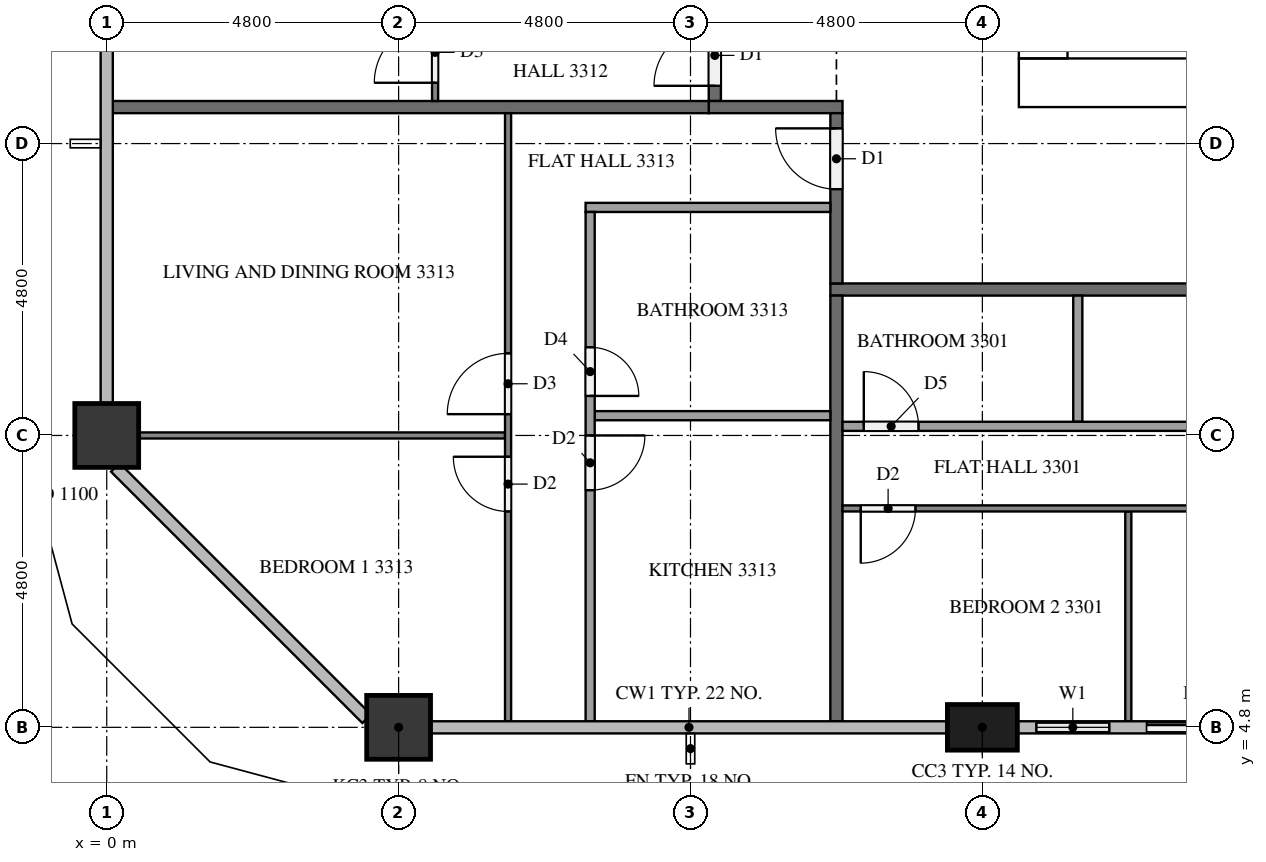
"""IFC4 building model, lengths in metres.
Left out: names, types, materials, properties, quantities, classifications, styles, units other than length and angle.
Written with IfcOpenShell. Run it as: python <this file> out.ifc"""

import sys

from ifc_helpers import new_model, si_unit, direction, frame, frame_2d, origin, origin_2d, place, context, subcontext, project, spatial, rectangle, extrude, element, fill, save


model = new_model("IFC4")
c1 = context("Model", 3, precision=1e-05, world=origin(), true_north=direction((0.0, 1.0)))
c2 = subcontext(c1, "Body", "Model", "MODEL_VIEW")
j1 = project(units=[si_unit("LENGTHUNIT", "METRE"), si_unit("PLANEANGLEUNIT", "RADIAN")], contexts=[c1])
p1 = place(None, origin())
s1 = spatial("IfcSite", under=j1, at=p1, CompositionType="ELEMENT")
p2 = place(p1, origin())
s2 = spatial("IfcBuilding", under=s1, at=p2, CompositionType="ELEMENT")
p3 = place(p2, frame((0.0, 0.0, 129.6)))
s3 = spatial("IfcBuildingStorey", under=s2, at=p3, CompositionType="ELEMENT", Elevation=129.6)
p4 = place(p3, frame((15.0, 15.4, 0.0), z_axis=(0.0, 0.0, 1.0), x_axis=(1.0, 0.0, 0.0)))
e1 = element("IfcWall", 1, at=p4, inside=s3, PredefinedType="SHEAR", context=c2, shape_type="SweptSolid", body=[
    extrude(rectangle(XDim=32.4, YDim=0.8, at=frame_2d((16.2, 0.0))), origin(), (0.0, 0.0, 1.0), 3.2),
])
p5 = place(p4, frame((15.3, 0.0, 0.0)))
e2 = element("IfcOpeningElement", 2, at=p5, cuts=e1, PredefinedType="OPENING", context=c2, shape_type="SweptSolid", body=[
    extrude(rectangle(XDim=1.8, YDim=2.1, at=frame_2d((0.9, 1.05))), frame((0.0, 0.41, 0.0), z_axis=(0.0, -1.0, 0.0), x_axis=(1.0, 0.0, 0.0)), (0.0, 0.0, 1.0), 0.82),
])
p6 = place(p3, frame((15.4, 15.8, 0.0), z_axis=(0.0, 0.0, 1.0), x_axis=(0.0, 1.0, 0.0)))
e3 = element("IfcWall", 3, at=p6, inside=s3, PredefinedType="SHEAR", context=c2, shape_type="SweptSolid", body=[
    extrude(rectangle(XDim=21.2, YDim=0.8, at=frame_2d((10.6, 0.0))), origin(), (0.0, 0.0, 1.0), 3.2),
])
p7 = place(p6, frame((4.96, 0.0, 0.0)))
e4 = element("IfcOpeningElement", 4, at=p7, cuts=e3, PredefinedType="OPENING", context=c2, shape_type="SweptSolid", body=[
    extrude(rectangle(XDim=1.2, YDim=2.1, at=frame_2d((0.6, 1.05))), frame((0.0, 0.41, 0.0), z_axis=(0.0, -1.0, 0.0), x_axis=(1.0, 0.0, 0.0)), (0.0, 0.0, 1.0), 0.82),
])
p8 = place(p3, frame((4.8, 4.8, 0.0), z_axis=(0.0, 0.0, 1.0), x_axis=(1.0, 0.0, 0.0)))
e5 = element("IfcColumn", 5, at=p8, inside=s3, PredefinedType="COLUMN", context=c2, shape_type="SweptSolid", body=[
    extrude(rectangle(XDim=1.05, YDim=1.05, at=origin_2d()), origin(), (0.0, 0.0, 1.0), 3.2),
])
p9 = place(p3, frame((14.4, 4.8, 0.0), z_axis=(0.0, 0.0, 1.0), x_axis=(1.0, 0.0, 0.0)))
e6 = element("IfcColumn", 6, at=p9, inside=s3, PredefinedType="COLUMN", context=c2, shape_type="SweptSolid", body=[
    extrude(rectangle(XDim=1.15, YDim=0.75, at=origin_2d()), origin(), (0.0, 0.0, 1.0), 3.2),
])
p10 = place(p3, frame((0.0, 9.6, 0.0), z_axis=(0.0, 0.0, 1.0), x_axis=(1.0, 0.0, 0.0)))
e7 = element("IfcColumn", 7, at=p10, inside=s3, PredefinedType="COLUMN", context=c2, shape_type="SweptSolid", body=[
    extrude(rectangle(XDim=1.05, YDim=1.05, at=origin_2d()), origin(), (0.0, 0.0, 1.0), 3.2),
])
p11 = place(p3, frame((14.975, 4.8, 0.0), z_axis=(0.0, 0.0, 1.0), x_axis=(1.0, 0.0, 0.0)))
e8 = element("IfcWall", 8, at=p11, inside=s3, PredefinedType="SOLIDWALL", context=c2, shape_type="SweptSolid", body=[
    extrude(rectangle(XDim=4.225, YDim=0.15, at=frame_2d((2.112, 0.0))), origin(), (0.0, 0.0, 1.0), 3.2),
])
p12 = place(p11, frame((0.312, 0.0, 0.9)))
e9 = element("IfcOpeningElement", 9, at=p12, cuts=e8, PredefinedType="OPENING", context=c2, shape_type="SweptSolid", body=[
    extrude(rectangle(XDim=1.2, YDim=1.4, at=frame_2d((0.6, 0.7))), frame((0.0, 0.085, 0.0), z_axis=(0.0, -1.0, 0.0), x_axis=(1.0, 0.0, 0.0)), (0.0, 0.0, 1.0), 0.17),
])
p13 = place(p11, frame((2.125, 0.0, 0.0)))
e10 = element("IfcOpeningElement", 10, at=p13, cuts=e8, PredefinedType="OPENING", context=c2, shape_type="SweptSolid", body=[
    extrude(rectangle(XDim=1.8, YDim=2.4, at=frame_2d((0.9, 1.2))), frame((0.0, 0.085, 0.0), z_axis=(0.0, -1.0, 0.0), x_axis=(1.0, 0.0, 0.0)), (0.0, 0.0, 1.0), 0.17),
])
p14 = place(p3, frame((50.5, 12.0, 0.0), z_axis=(0.0, 0.0, 1.0), x_axis=(-1.0, 0.0, 0.0)))
e11 = element("IfcWall", 11, at=p14, inside=s3, PredefinedType="PARTITIONING", context=c2, shape_type="SweptSolid", body=[
    extrude(rectangle(XDim=38.6, YDim=0.2, at=frame_2d((19.3, 0.0))), origin(), (0.0, 0.0, 1.0), 3.2),
])
p15 = place(p14, frame((24.45, 0.0, 0.0)))
e12 = element("IfcOpeningElement", 12, at=p15, cuts=e11, PredefinedType="OPENING", context=c2, shape_type="SweptSolid", body=[
    extrude(rectangle(XDim=1.0, YDim=2.1, at=frame_2d((0.5, 1.05))), frame((0.0, 0.11, 0.0), z_axis=(0.0, -1.0, 0.0), x_axis=(1.0, 0.0, 0.0)), (0.0, 0.0, 1.0), 0.22),
])
p16 = place(p14, frame((10.05, 0.0, 0.0)))
e13 = element("IfcOpeningElement", 13, at=p16, cuts=e11, PredefinedType="OPENING", context=c2, shape_type="SweptSolid", body=[
    extrude(rectangle(XDim=1.0, YDim=2.1, at=frame_2d((0.5, 1.05))), frame((0.0, 0.11, 0.0), z_axis=(0.0, -1.0, 0.0), x_axis=(1.0, 0.0, 0.0)), (0.0, 0.0, 1.0), 0.22),
])
p17 = place(p14, frame((8.35, 0.0, 0.0)))
e14 = element("IfcOpeningElement", 14, at=p17, cuts=e11, PredefinedType="OPENING", context=c2, shape_type="SweptSolid", body=[
    extrude(rectangle(XDim=1.0, YDim=2.1, at=frame_2d((0.5, 1.05))), frame((0.0, 0.11, 0.0), z_axis=(0.0, -1.0, 0.0), x_axis=(1.0, 0.0, 0.0)), (0.0, 0.0, 1.0), 0.22),
])
p18 = place(p3, frame((10.0, 15.1, 0.0), z_axis=(0.0, 0.0, 1.0), x_axis=(0.0, 1.0, 0.0)))
e15 = element("IfcWall", 15, at=p18, inside=s3, PredefinedType="PARTITIONING", context=c2, shape_type="SweptSolid", body=[
    extrude(rectangle(XDim=22.6, YDim=0.2, at=frame_2d((11.3, 0.0))), origin(), (0.0, 0.0, 1.0), 3.2),
])
p19 = place(p18, frame((16.45, 0.0, 0.0)))
e16 = element("IfcOpeningElement", 16, at=p19, cuts=e15, PredefinedType="OPENING", context=c2, shape_type="SweptSolid", body=[
    extrude(rectangle(XDim=1.0, YDim=2.1, at=frame_2d((0.5, 1.05))), frame((0.0, 0.11, 0.0), z_axis=(0.0, -1.0, 0.0), x_axis=(1.0, 0.0, 0.0)), (0.0, 0.0, 1.0), 0.22),
])
p20 = place(p18, frame((0.25, 0.0, 0.0)))
e17 = element("IfcOpeningElement", 17, at=p20, cuts=e15, PredefinedType="OPENING", context=c2, shape_type="SweptSolid", body=[
    extrude(rectangle(XDim=1.0, YDim=2.1, at=frame_2d((0.5, 1.05))), frame((0.0, 0.11, 0.0), z_axis=(0.0, -1.0, 0.0), x_axis=(1.0, 0.0, 0.0)), (0.0, 0.0, 1.0), 0.22),
])
p21 = place(p3, frame((9.9, 15.0, 0.0), z_axis=(0.0, 0.0, 1.0), x_axis=(1.0, 0.0, 0.0)))
e18 = element("IfcWall", 18, at=p21, inside=s3, PredefinedType="PARTITIONING", context=c2, shape_type="SweptSolid", body=[
    extrude(rectangle(XDim=2.2, YDim=0.2, at=frame_2d((1.1, 0.0))), origin(), (0.0, 0.0, 1.0), 3.2),
])
p22 = place(p3, frame((12.0, 12.1, 0.0), z_axis=(0.0, 0.0, 1.0), x_axis=(0.0, 1.0, 0.0)))
e19 = element("IfcWall", 19, at=p22, inside=s3, PredefinedType="PARTITIONING", context=c2, shape_type="SweptSolid", body=[
    extrude(rectangle(XDim=2.8, YDim=0.2, at=frame_2d((1.4, 0.0))), origin(), (0.0, 0.0, 1.0), 3.2),
])
p23 = place(p22, frame((1.55, 0.0, 0.0)))
e20 = element("IfcOpeningElement", 20, at=p23, cuts=e19, PredefinedType="OPENING", context=c2, shape_type="SweptSolid", body=[
    extrude(rectangle(XDim=1.0, YDim=2.1, at=frame_2d((0.5, 1.05))), frame((0.0, 0.11, 0.0), z_axis=(0.0, -1.0, 0.0), x_axis=(1.0, 0.0, 0.0)), (0.0, 0.0, 1.0), 0.22),
])
p24 = place(p3, frame((12.0, 4.9, 0.0), z_axis=(0.0, 0.0, 1.0), x_axis=(0.0, 1.0, 0.0)))
e21 = element("IfcWall", 21, at=p24, inside=s3, PredefinedType="PARTITIONING", context=c2, shape_type="SweptSolid", body=[
    extrude(rectangle(XDim=7.0, YDim=0.2, at=frame_2d((3.5, 0.0))), origin(), (0.0, 0.0, 1.0), 3.2),
])
p25 = place(p3, frame((0.1, 15.0, 0.0), z_axis=(0.0, 0.0, 1.0), x_axis=(1.0, 0.0, 0.0)))
e22 = element("IfcWall", 22, at=p25, inside=s3, PredefinedType="PARTITIONING", context=c2, shape_type="SweptSolid", body=[
    extrude(rectangle(XDim=9.8, YDim=0.2, at=frame_2d((4.9, 0.0))), origin(), (0.0, 0.0, 1.0), 3.2),
])
p26 = place(p3, frame((16.8, 8.35, 0.0), z_axis=(0.0, 0.0, 1.0), x_axis=(0.0, -1.0, 0.0)))
e23 = element("IfcWall", 23, at=p26, inside=s3, PredefinedType="PARTITIONING", context=c2, shape_type="SweptSolid", body=[
    extrude(rectangle(XDim=3.45, YDim=0.1, at=frame_2d((1.725, 0.0))), origin(), (0.0, 0.0, 1.0), 3.2),
])
p27 = place(p3, frame((26.3, 8.4, 0.0), z_axis=(0.0, 0.0, 1.0), x_axis=(-1.0, 0.0, 0.0)))
e24 = element("IfcWall", 24, at=p27, inside=s3, PredefinedType="PARTITIONING", context=c2, shape_type="SweptSolid", body=[
    extrude(rectangle(XDim=14.2, YDim=0.1, at=frame_2d((7.1, 0.0))), origin(), (0.0, 0.0, 1.0), 3.2),
])
p28 = place(p27, frame((3.45, 0.0, 0.0)))
e25 = element("IfcOpeningElement", 25, at=p28, cuts=e24, PredefinedType="OPENING", context=c2, shape_type="SweptSolid", body=[
    extrude(rectangle(XDim=0.9, YDim=2.1, at=frame_2d((0.45, 1.05))), frame((0.0, 0.06, 0.0), z_axis=(0.0, -1.0, 0.0), x_axis=(1.0, 0.0, 0.0)), (0.0, 0.0, 1.0), 0.12),
])
p29 = place(p27, frame((5.05, 0.0, 0.0)))
e26 = element("IfcOpeningElement", 26, at=p29, cuts=e24, PredefinedType="OPENING", context=c2, shape_type="SweptSolid", body=[
    extrude(rectangle(XDim=1.0, YDim=2.1, at=frame_2d((0.5, 1.05))), frame((0.0, 0.06, 0.0), z_axis=(0.0, -1.0, 0.0), x_axis=(1.0, 0.0, 0.0)), (0.0, 0.0, 1.0), 0.12),
])
p30 = place(p27, frame((13.0, 0.0, 0.0)))
e27 = element("IfcOpeningElement", 27, at=p30, cuts=e24, PredefinedType="OPENING", context=c2, shape_type="SweptSolid", body=[
    extrude(rectangle(XDim=0.9, YDim=2.1, at=frame_2d((0.45, 1.05))), frame((0.0, 0.06, 0.0), z_axis=(0.0, -1.0, 0.0), x_axis=(1.0, 0.0, 0.0)), (0.0, 0.0, 1.0), 0.12),
])
p31 = place(p3, frame((15.969, 11.9, 0.0), z_axis=(0.0, 0.0, 1.0), x_axis=(0.0, -1.0, 0.0)))
e28 = element("IfcWall", 28, at=p31, inside=s3, PredefinedType="PARTITIONING", context=c2, shape_type="SweptSolid", body=[
    extrude(rectangle(XDim=2.075, YDim=0.15, at=frame_2d((1.038, 0.0))), origin(), (0.0, 0.0, 1.0), 3.2),
])
p32 = place(p3, frame((12.1, 9.75, 0.0), z_axis=(0.0, 0.0, 1.0), x_axis=(1.0, 0.0, 0.0)))
e29 = element("IfcWall", 29, at=p32, inside=s3, PredefinedType="PARTITIONING", context=c2, shape_type="SweptSolid", body=[
    extrude(rectangle(XDim=12.575, YDim=0.15, at=frame_2d((6.288, 0.0))), origin(), (0.0, 0.0, 1.0), 3.2),
])
p33 = place(p32, frame((9.998, 0.0, 0.0)))
e30 = element("IfcOpeningElement", 30, at=p33, cuts=e29, PredefinedType="OPENING", context=c2, shape_type="SweptSolid", body=[
    extrude(rectangle(XDim=0.8, YDim=2.1, at=frame_2d((0.4, 1.05))), frame((0.0, 0.085, 0.0), z_axis=(0.0, -1.0, 0.0), x_axis=(1.0, 0.0, 0.0)), (0.0, 0.0, 1.0), 0.17),
])
p34 = place(p32, frame((8.448, 0.0, 0.0)))
e31 = element("IfcOpeningElement", 31, at=p34, cuts=e29, PredefinedType="OPENING", context=c2, shape_type="SweptSolid", body=[
    extrude(rectangle(XDim=0.9, YDim=2.1, at=frame_2d((0.45, 1.05))), frame((0.0, 0.085, 0.0), z_axis=(0.0, -1.0, 0.0), x_axis=(1.0, 0.0, 0.0)), (0.0, 0.0, 1.0), 0.17),
])
p35 = place(p32, frame((0.35, 0.0, 0.0)))
e32 = element("IfcOpeningElement", 32, at=p35, cuts=e29, PredefinedType="OPENING", context=c2, shape_type="SweptSolid", body=[
    extrude(rectangle(XDim=0.9, YDim=2.1, at=frame_2d((0.45, 1.05))), frame((0.0, 0.085, 0.0), z_axis=(0.0, -1.0, 0.0), x_axis=(1.0, 0.0, 0.0)), (0.0, 0.0, 1.0), 0.17),
])
p36 = place(p3, frame((5.4, 15.1, 0.0), z_axis=(0.0, 0.0, 1.0), x_axis=(0.0, 1.0, 0.0)))
e33 = element("IfcWall", 33, at=p36, inside=s3, PredefinedType="PARTITIONING", context=c2, shape_type="SweptSolid", body=[
    extrude(rectangle(XDim=16.0, YDim=0.1, at=frame_2d((8.0, 0.0))), origin(), (0.0, 0.0, 1.0), 3.2),
])
p37 = place(p36, frame((0.3, 0.0, 0.0)))
e34 = element("IfcOpeningElement", 34, at=p37, cuts=e33, PredefinedType="OPENING", context=c2, shape_type="SweptSolid", body=[
    extrude(rectangle(XDim=1.0, YDim=2.1, at=frame_2d((0.5, 1.05))), frame((0.0, 0.06, 0.0), z_axis=(0.0, -1.0, 0.0), x_axis=(1.0, 0.0, 0.0)), (0.0, 0.0, 1.0), 0.12),
])
p38 = place(p36, frame((10.05, 0.0, 0.0)))
e35 = element("IfcOpeningElement", 35, at=p38, cuts=e33, PredefinedType="OPENING", context=c2, shape_type="SweptSolid", body=[
    extrude(rectangle(XDim=0.9, YDim=2.1, at=frame_2d((0.45, 1.05))), frame((0.0, 0.06, 0.0), z_axis=(0.0, -1.0, 0.0), x_axis=(1.0, 0.0, 0.0)), (0.0, 0.0, 1.0), 0.12),
])
p39 = place(p36, frame((11.65, 0.0, 0.0)))
e36 = element("IfcOpeningElement", 36, at=p39, cuts=e33, PredefinedType="OPENING", context=c2, shape_type="SweptSolid", body=[
    extrude(rectangle(XDim=0.9, YDim=2.1, at=frame_2d((0.45, 1.05))), frame((0.0, 0.06, 0.0), z_axis=(0.0, -1.0, 0.0), x_axis=(1.0, 0.0, 0.0)), (0.0, 0.0, 1.0), 0.12),
])
p40 = place(p3, frame((6.55, 9.6, 0.0), z_axis=(0.0, 0.0, 1.0), x_axis=(-1.0, 0.0, 0.0)))
e37 = element("IfcWall", 37, at=p40, inside=s3, PredefinedType="PARTITIONING", context=c2, shape_type="SweptSolid", body=[
    extrude(rectangle(XDim=6.025, YDim=0.1, at=frame_2d((3.013, 0.0))), origin(), (0.0, 0.0, 1.0), 3.2),
])
p41 = place(p3, frame((6.6, 4.9, 0.0), z_axis=(0.0, 0.0, 1.0), x_axis=(0.0, 1.0, 0.0)))
e38 = element("IfcWall", 38, at=p41, inside=s3, PredefinedType="PARTITIONING", context=c2, shape_type="SweptSolid", body=[
    extrude(rectangle(XDim=10.0, YDim=0.1, at=frame_2d((5.0, 0.0))), origin(), (0.0, 0.0, 1.0), 3.2),
])
p42 = place(p41, frame((5.05, 0.0, 0.0)))
e39 = element("IfcOpeningElement", 39, at=p42, cuts=e38, PredefinedType="OPENING", context=c2, shape_type="SweptSolid", body=[
    extrude(rectangle(XDim=1.0, YDim=2.1, at=frame_2d((0.5, 1.05))), frame((0.0, 0.06, 0.0), z_axis=(0.0, -1.0, 0.0), x_axis=(1.0, 0.0, 0.0)), (0.0, 0.0, 1.0), 0.12),
])
p43 = place(p41, frame((3.45, 0.0, 0.0)))
e40 = element("IfcOpeningElement", 40, at=p43, cuts=e38, PredefinedType="OPENING", context=c2, shape_type="SweptSolid", body=[
    extrude(rectangle(XDim=0.9, YDim=2.1, at=frame_2d((0.45, 1.05))), frame((0.0, 0.06, 0.0), z_axis=(0.0, -1.0, 0.0), x_axis=(1.0, 0.0, 0.0)), (0.0, 0.0, 1.0), 0.12),
])
p44 = place(p3, frame((11.9, 9.925, 0.0), z_axis=(0.0, 0.0, 1.0), x_axis=(-1.0, 0.0, 0.0)))
e41 = element("IfcWall", 41, at=p44, inside=s3, PredefinedType="PARTITIONING", context=c2, shape_type="SweptSolid", body=[
    extrude(rectangle(XDim=3.875, YDim=0.15, at=frame_2d((1.938, 0.0))), origin(), (0.0, 0.0, 1.0), 3.2),
])
p45 = place(p3, frame((11.9, 13.35, 0.0), z_axis=(0.0, 0.0, 1.0), x_axis=(-1.0, 0.0, 0.0)))
e42 = element("IfcWall", 42, at=p45, inside=s3, PredefinedType="PARTITIONING", context=c2, shape_type="SweptSolid", body=[
    extrude(rectangle(XDim=4.025, YDim=0.15, at=frame_2d((2.012, 0.0))), origin(), (0.0, 0.0, 1.0), 3.2),
])
p46 = place(p3, frame((7.95, 13.275, 0.0), z_axis=(0.0, 0.0, 1.0), x_axis=(0.0, -1.0, 0.0)))
e43 = element("IfcWall", 43, at=p46, inside=s3, PredefinedType="PARTITIONING", context=c2, shape_type="SweptSolid", body=[
    extrude(rectangle(XDim=8.375, YDim=0.15, at=frame_2d((4.188, 0.0))), origin(), (0.0, 0.0, 1.0), 3.2),
])
p47 = place(p46, frame((2.225, 0.0, 0.0)))
e44 = element("IfcOpeningElement", 44, at=p47, cuts=e43, PredefinedType="OPENING", context=c2, shape_type="SweptSolid", body=[
    extrude(rectangle(XDim=0.8, YDim=2.1, at=frame_2d((0.4, 1.05))), frame((0.0, 0.085, 0.0), z_axis=(0.0, -1.0, 0.0), x_axis=(1.0, 0.0, 0.0)), (0.0, 0.0, 1.0), 0.17),
])
p48 = place(p46, frame((3.675, 0.0, 0.0)))
e45 = element("IfcOpeningElement", 45, at=p48, cuts=e43, PredefinedType="OPENING", context=c2, shape_type="SweptSolid", body=[
    extrude(rectangle(XDim=0.9, YDim=2.1, at=frame_2d((0.45, 1.05))), frame((0.0, 0.085, 0.0), z_axis=(0.0, -1.0, 0.0), x_axis=(1.0, 0.0, 0.0)), (0.0, 0.0, 1.0), 0.17),
])
p49 = place(p12, origin())
e46 = element("IfcWindow", 46, at=p49, inside=s3, PartitioningType="SINGLE_PANEL", PredefinedType="WINDOW", context=c2, shape_type="SweptSolid", body=[
    extrude(rectangle(XDim=1.2, YDim=1.4, at=frame_2d((0.6, 0.7))), frame((0.0, 0.03, 0.0), z_axis=(0.0, -1.0, 0.0), x_axis=(1.0, 0.0, 0.0)), (0.0, 0.0, 1.0), 0.06),
])
fill(e9, e46)
p50 = place(p13, origin())
e47 = element("IfcDoor", 47, at=p50, inside=s3, OperationType="SLIDING_TO_LEFT", PredefinedType="DOOR", context=c2, shape_type="SweptSolid", body=[
    extrude(rectangle(XDim=1.8, YDim=2.4, at=frame_2d((0.9, 1.2))), frame((0.0, 0.025, 0.0), z_axis=(0.0, -1.0, 0.0), x_axis=(1.0, 0.0, 0.0)), (0.0, 0.0, 1.0), 0.05),
])
fill(e10, e47)
p51 = place(p20, origin())
e48 = element("IfcDoor", 48, at=p51, inside=s3, OperationType="SINGLE_SWING_LEFT", PredefinedType="DOOR", context=c2, shape_type="SweptSolid", body=[
    extrude(rectangle(XDim=1.0, YDim=2.1, at=frame_2d((0.5, 1.05))), frame((0.0, 0.025, 0.0), z_axis=(0.0, -1.0, 0.0), x_axis=(1.0, 0.0, 0.0)), (0.0, 0.0, 1.0), 0.05),
])
fill(e17, e48)
p52 = place(p23, origin())
e49 = element("IfcDoor", 49, at=p52, inside=s3, OperationType="SINGLE_SWING_RIGHT", PredefinedType="DOOR", context=c2, shape_type="SweptSolid", body=[
    extrude(rectangle(XDim=1.0, YDim=2.1, at=frame_2d((0.5, 1.05))), frame((0.0, 0.025, 0.0), z_axis=(0.0, -1.0, 0.0), x_axis=(1.0, 0.0, 0.0)), (0.0, 0.0, 1.0), 0.05),
])
fill(e20, e49)
p53 = place(p30, origin())
e50 = element("IfcDoor", 50, at=p53, inside=s3, OperationType="SINGLE_SWING_RIGHT", PredefinedType="DOOR", context=c2, shape_type="SweptSolid", body=[
    extrude(rectangle(XDim=0.9, YDim=2.1, at=frame_2d((0.45, 1.05))), frame((0.0, 0.025, 0.0), z_axis=(0.0, -1.0, 0.0), x_axis=(1.0, 0.0, 0.0)), (0.0, 0.0, 1.0), 0.05),
])
fill(e27, e50)
p54 = place(p35, origin())
e51 = element("IfcDoor", 51, at=p54, inside=s3, OperationType="SINGLE_SWING_LEFT", PredefinedType="DOOR", context=c2, shape_type="SweptSolid", body=[
    extrude(rectangle(XDim=0.9, YDim=2.1, at=frame_2d((0.45, 1.05))), frame((0.0, 0.025, 0.0), z_axis=(0.0, -1.0, 0.0), x_axis=(1.0, 0.0, 0.0)), (0.0, 0.0, 1.0), 0.05),
])
fill(e32, e51)
p55 = place(p37, origin())
e52 = element("IfcDoor", 52, at=p55, inside=s3, OperationType="SINGLE_SWING_LEFT", PredefinedType="DOOR", context=c2, shape_type="SweptSolid", body=[
    extrude(rectangle(XDim=1.0, YDim=2.1, at=frame_2d((0.5, 1.05))), frame((0.0, 0.025, 0.0), z_axis=(0.0, -1.0, 0.0), x_axis=(1.0, 0.0, 0.0)), (0.0, 0.0, 1.0), 0.05),
])
fill(e34, e52)
p56 = place(p42, origin())
e53 = element("IfcDoor", 53, at=p56, inside=s3, OperationType="SINGLE_SWING_LEFT", PredefinedType="DOOR", context=c2, shape_type="SweptSolid", body=[
    extrude(rectangle(XDim=1.0, YDim=2.1, at=frame_2d((0.5, 1.05))), frame((0.0, 0.025, 0.0), z_axis=(0.0, -1.0, 0.0), x_axis=(1.0, 0.0, 0.0)), (0.0, 0.0, 1.0), 0.05),
])
fill(e39, e53)
p57 = place(p43, origin())
e54 = element("IfcDoor", 54, at=p57, inside=s3, OperationType="SINGLE_SWING_RIGHT", PredefinedType="DOOR", context=c2, shape_type="SweptSolid", body=[
    extrude(rectangle(XDim=0.9, YDim=2.1, at=frame_2d((0.45, 1.05))), frame((0.0, 0.025, 0.0), z_axis=(0.0, -1.0, 0.0), x_axis=(1.0, 0.0, 0.0)), (0.0, 0.0, 1.0), 0.05),
])
fill(e40, e54)
p58 = place(p47, origin())
e55 = element("IfcDoor", 55, at=p58, inside=s3, OperationType="SINGLE_SWING_RIGHT", PredefinedType="DOOR", context=c2, shape_type="SweptSolid", body=[
    extrude(rectangle(XDim=0.8, YDim=2.1, at=frame_2d((0.4, 1.05))), frame((0.0, 0.025, 0.0), z_axis=(0.0, -1.0, 0.0), x_axis=(1.0, 0.0, 0.0)), (0.0, 0.0, 1.0), 0.05),
])
fill(e44, e55)
p59 = place(p48, origin())
e56 = element("IfcDoor", 56, at=p59, inside=s3, OperationType="SINGLE_SWING_LEFT", PredefinedType="DOOR", context=c2, shape_type="SweptSolid", body=[
    extrude(rectangle(XDim=0.9, YDim=2.1, at=frame_2d((0.45, 1.05))), frame((0.0, 0.025, 0.0), z_axis=(0.0, -1.0, 0.0), x_axis=(1.0, 0.0, 0.0)), (0.0, 0.0, 1.0), 0.05),
])
fill(e45, e56)
save(model, sys.argv[1])
